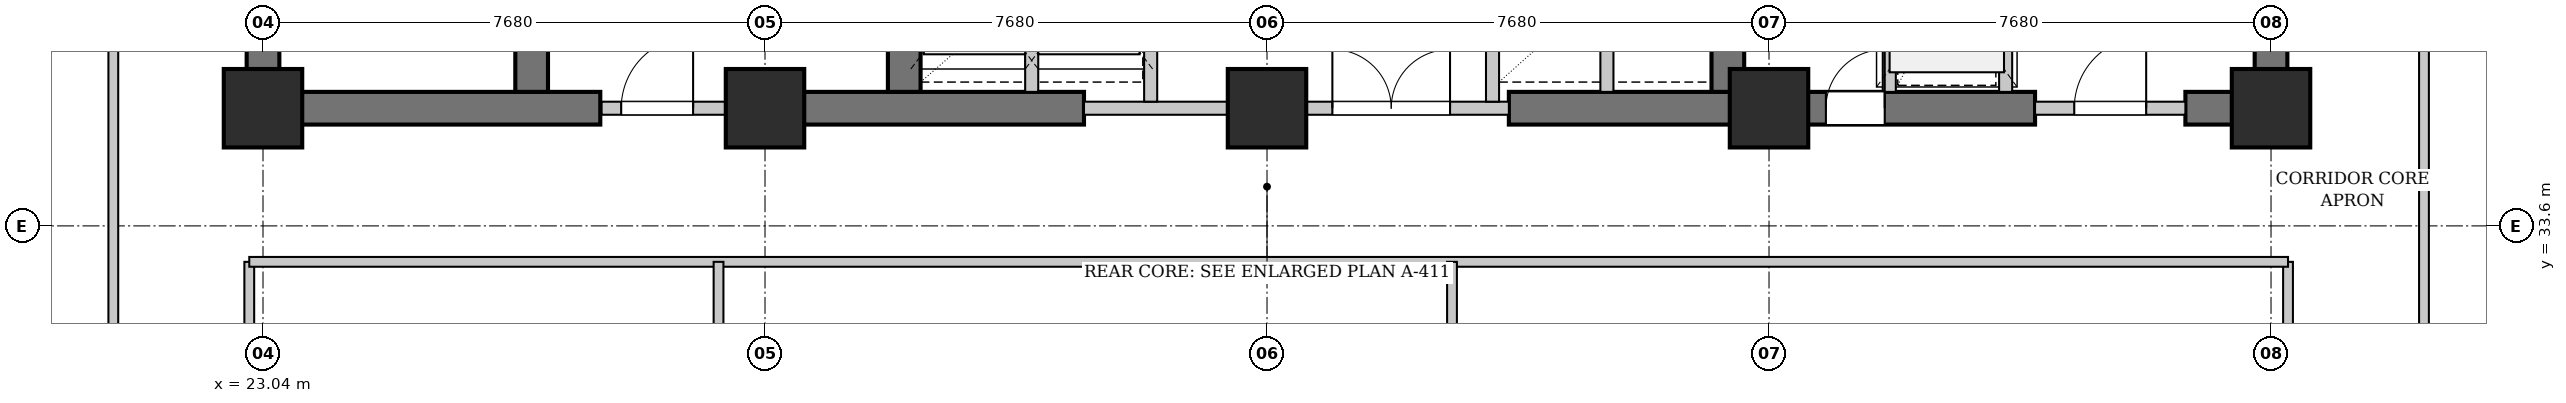
"""IFC4 building model, lengths in metres.
Left out: names, types, materials, properties, quantities, classifications, styles, units other than length and angle.
Written with IfcOpenShell. Run it as: python <this file> out.ifc"""

import sys

from ifc_helpers import new_model, si_unit, direction, frame, frame_2d, origin, origin_2d, place, context, subcontext, project, spatial, rectangle, extrude, element, fill, save


model = new_model("IFC4")
c1 = context("Model", 3, precision=1e-05, world=origin(), true_north=direction((0.0, 1.0)))
c2 = subcontext(c1, "Body", "Model", "MODEL_VIEW")
j1 = project(units=[si_unit("LENGTHUNIT", "METRE"), si_unit("PLANEANGLEUNIT", "RADIAN")], contexts=[c1])
p1 = place(None, origin())
s1 = spatial("IfcSite", under=j1, at=p1, CompositionType="ELEMENT")
p2 = place(p1, origin())
s2 = spatial("IfcBuilding", under=s1, at=p2, CompositionType="ELEMENT")
p3 = place(p2, frame((0.0, 0.0, 37.2)))
s3 = spatial("IfcBuildingStorey", under=s2, at=p3, CompositionType="ELEMENT", Elevation=37.2)
p4 = place(p3, frame((22.79, 35.4, 0.0), z_axis=(0.0, 0.0, 1.0), x_axis=(1.0, 0.0, 0.0)))
e1 = element("IfcWall", 1, at=p4, inside=s3, PredefinedType="SHEAR", context=c2, shape_type="SweptSolid", body=[
    extrude(rectangle(XDim=5.41, YDim=0.5, at=frame_2d((2.705, 0.0))), origin(), (0.0, 0.0, 1.0), 3.18),
])
p5 = place(p3, frame((30.72, 35.4, 0.0), z_axis=(0.0, 0.0, 1.0), x_axis=(1.0, 0.0, 0.0)))
e2 = element("IfcWall", 2, at=p5, inside=s3, PredefinedType="SHEAR", context=c2, shape_type="SweptSolid", body=[
    extrude(rectangle(XDim=4.88, YDim=0.5, at=frame_2d((2.44, 0.0))), origin(), (0.0, 0.0, 1.0), 3.18),
])
p6 = place(p3, frame((42.1, 35.4, 0.0), z_axis=(0.0, 0.0, 1.0), x_axis=(1.0, 0.0, 0.0)))
e3 = element("IfcWall", 3, at=p6, inside=s3, PredefinedType="SHEAR", context=c2, shape_type="SweptSolid", body=[
    extrude(rectangle(XDim=8.05, YDim=0.5, at=frame_2d((4.025, 0.0))), origin(), (0.0, 0.0, 1.0), 3.18),
])
p7 = place(p6, frame((4.85, 0.0, 0.0)))
e4 = element("IfcOpeningElement", 4, at=p7, cuts=e3, PredefinedType="OPENING", context=c2, shape_type="SweptSolid", body=[
    extrude(rectangle(XDim=0.9, YDim=2.15, at=frame_2d((0.45, 1.075))), frame((0.0, 0.26, 0.0), z_axis=(0.0, -1.0, 0.0), x_axis=(1.0, 0.0, 0.0)), (0.0, 0.0, 1.0), 0.52),
])
p8 = place(p3, frame((52.45, 35.4, 0.0), z_axis=(0.0, 0.0, 1.0), x_axis=(1.0, 0.0, 0.0)))
e5 = element("IfcWall", 5, at=p8, inside=s3, PredefinedType="SHEAR", context=c2, shape_type="SweptSolid", body=[
    extrude(rectangle(XDim=1.56, YDim=0.5, at=frame_2d((0.78, 0.0))), origin(), (0.0, 0.0, 1.0), 3.18),
])
p9 = place(p3, frame((23.04, 35.65, 0.0), z_axis=(0.0, 0.0, 1.0), x_axis=(0.0, 1.0, 0.0)))
e6 = element("IfcWall", 6, at=p9, inside=s3, PredefinedType="SHEAR", context=c2, shape_type="SweptSolid", body=[
    extrude(rectangle(XDim=10.3, YDim=0.5, at=frame_2d((5.15, 0.0))), origin(), (0.0, 0.0, 1.0), 3.18),
])
p10 = place(p3, frame((27.15, 35.65, 0.0), z_axis=(0.0, 0.0, 1.0), x_axis=(0.0, 1.0, 0.0)))
e7 = element("IfcWall", 7, at=p10, inside=s3, PredefinedType="SHEAR", context=c2, shape_type="SweptSolid", body=[
    extrude(rectangle(XDim=10.3, YDim=0.5, at=frame_2d((5.15, 0.0))), origin(), (0.0, 0.0, 1.0), 3.18),
])
p11 = place(p10, frame((0.65, 0.0, 0.0)))
e8 = element("IfcOpeningElement", 8, at=p11, cuts=e7, PredefinedType="OPENING", context=c2, shape_type="SweptSolid", body=[
    extrude(rectangle(XDim=1.1, YDim=2.15, at=frame_2d((0.55, 1.075))), frame((0.0, 0.26, 0.0), z_axis=(0.0, -1.0, 0.0), x_axis=(1.0, 0.0, 0.0)), (0.0, 0.0, 1.0), 0.52),
])
for number, where, z_axis, x_axis in (
    (9, (32.85, 35.65, 0.0), (0.0, 0.0, 1.0), (0.0, 1.0, 0.0)),
    (10, (45.45, 35.65, 0.0), (0.0, 0.0, 1.0), (0.0, 1.0, 0.0)),
    (11, (53.76, 35.65, 0.0), (0.0, 0.0, 1.0), (0.0, 1.0, 0.0)),
):
    element("IfcWall", number, at=place(p3, frame(where, z_axis=z_axis, x_axis=x_axis)), inside=s3, PredefinedType="SHEAR", context=c2, shape_type="SweptSolid", body=[
        extrude(rectangle(XDim=10.3, YDim=0.5, at=frame_2d((5.15, 0.0))), origin(), (0.0, 0.0, 1.0), 3.18),
    ])
for number, where, z_axis, x_axis in (
    (12, (23.04, 35.4, 0.0), (0.0, 0.0, 1.0), (1.0, 0.0, 0.0)),
    (13, (30.72, 35.4, 0.0), (0.0, 0.0, 1.0), (1.0, 0.0, 0.0)),
    (14, (38.4, 35.4, 0.0), (0.0, 0.0, 1.0), (1.0, 0.0, 0.0)),
    (15, (46.08, 35.4, 0.0), (0.0, 0.0, 1.0), (1.0, 0.0, 0.0)),
    (16, (53.76, 35.4, 0.0), (0.0, 0.0, 1.0), (1.0, 0.0, 0.0)),
):
    element("IfcColumn", number, at=place(p3, frame(where, z_axis=z_axis, x_axis=x_axis)), inside=s3, PredefinedType="COLUMN", context=c2, shape_type="SweptSolid", body=[
        extrude(rectangle(XDim=1.2, YDim=1.2, at=origin_2d()), origin(), (0.0, 0.0, 1.0), 3.4),
    ])
p12 = place(p3, frame((28.22, 35.4, 0.0), z_axis=(0.0, 0.0, 1.0), x_axis=(1.0, 0.0, 0.0)))
e17 = element("IfcWall", 17, at=p12, inside=s3, PredefinedType="PARTITIONING", context=c2, shape_type="SweptSolid", body=[
    extrude(rectangle(XDim=2.5, YDim=0.2, at=frame_2d((1.25, 0.0))), origin(), (0.0, 0.0, 1.0), 2.475),
])
p13 = place(p12, frame((0.3, 0.0, 0.0)))
e18 = element("IfcOpeningElement", 18, at=p13, cuts=e17, PredefinedType="OPENING", context=c2, shape_type="SweptSolid", body=[
    extrude(rectangle(XDim=1.1, YDim=2.15, at=frame_2d((0.55, 1.075))), frame((0.0, 0.11, 0.0), z_axis=(0.0, -1.0, 0.0), x_axis=(1.0, 0.0, 0.0)), (0.0, 0.0, 1.0), 0.22),
])
p14 = place(p3, frame((35.6, 35.4, 0.0), z_axis=(0.0, 0.0, 1.0), x_axis=(1.0, 0.0, 0.0)))
e19 = element("IfcWall", 19, at=p14, inside=s3, PredefinedType="PARTITIONING", context=c2, shape_type="SweptSolid", body=[
    extrude(rectangle(XDim=6.5, YDim=0.2, at=frame_2d((3.25, 0.0))), origin(), (0.0, 0.0, 1.0), 2.475),
])
p15 = place(p14, frame((3.8, 0.0, 0.0)))
e20 = element("IfcOpeningElement", 20, at=p15, cuts=e19, PredefinedType="OPENING", context=c2, shape_type="SweptSolid", body=[
    extrude(rectangle(XDim=1.8, YDim=2.3, at=frame_2d((0.9, 1.15))), frame((0.0, 0.11, 0.0), z_axis=(0.0, -1.0, 0.0), x_axis=(1.0, 0.0, 0.0)), (0.0, 0.0, 1.0), 0.22),
])
p16 = place(p3, frame((34.8, 35.65, 0.0), z_axis=(0.0, 0.0, 1.0), x_axis=(0.0, 1.0, 0.0)))
e21 = element("IfcWall", 21, at=p16, inside=s3, PredefinedType="PARTITIONING", context=c2, shape_type="SweptSolid", body=[
    extrude(rectangle(XDim=3.25, YDim=0.2, at=frame_2d((1.625, 0.0))), origin(), (0.0, 0.0, 1.0), 3.18),
])
p17 = place(p3, frame((36.62, 35.5, 0.0), z_axis=(0.0, 0.0, 1.0), x_axis=(0.0, 1.0, 0.0)))
e22 = element("IfcWall", 22, at=p17, inside=s3, PredefinedType="PARTITIONING", context=c2, shape_type="SweptSolid", body=[
    extrude(rectangle(XDim=3.4, YDim=0.2, at=frame_2d((1.7, 0.0))), origin(), (0.0, 0.0, 1.0), 3.18),
])
p18 = place(p3, frame((43.6, 35.65, 0.0), z_axis=(0.0, 0.0, 1.0), x_axis=(0.0, 1.0, 0.0)))
e23 = element("IfcWall", 23, at=p18, inside=s3, PredefinedType="PARTITIONING", context=c2, shape_type="SweptSolid", body=[
    extrude(rectangle(XDim=3.25, YDim=0.2, at=frame_2d((1.625, 0.0))), origin(), (0.0, 0.0, 1.0), 3.18),
])
p19 = place(p3, frame((41.85, 35.5, 0.0), z_axis=(0.0, 0.0, 1.0), x_axis=(0.0, 1.0, 0.0)))
e24 = element("IfcWall", 24, at=p19, inside=s3, PredefinedType="PARTITIONING", context=c2, shape_type="SweptSolid", body=[
    extrude(rectangle(XDim=3.4, YDim=0.2, at=frame_2d((1.7, 0.0))), origin(), (0.0, 0.0, 1.0), 3.18),
])
p20 = place(p3, frame((50.15, 35.4, 0.0), z_axis=(0.0, 0.0, 1.0), x_axis=(1.0, 0.0, 0.0)))
e25 = element("IfcWall", 25, at=p20, inside=s3, PredefinedType="PARTITIONING", context=c2, shape_type="SweptSolid", body=[
    extrude(rectangle(XDim=2.3, YDim=0.2, at=frame_2d((1.15, 0.0))), origin(), (0.0, 0.0, 1.0), 2.475),
])
p21 = place(p20, frame((0.6, 0.0, 0.0)))
e26 = element("IfcOpeningElement", 26, at=p21, cuts=e25, PredefinedType="OPENING", context=c2, shape_type="SweptSolid", body=[
    extrude(rectangle(XDim=1.1, YDim=2.15, at=frame_2d((0.55, 1.075))), frame((0.0, 0.11, 0.0), z_axis=(0.0, -1.0, 0.0), x_axis=(1.0, 0.0, 0.0)), (0.0, 0.0, 1.0), 0.22),
])
p22 = place(p3, frame((49.7, 35.65, 0.0), z_axis=(0.0, 0.0, 1.0), x_axis=(0.0, 1.0, 0.0)))
e27 = element("IfcWall", 27, at=p22, inside=s3, PredefinedType="PARTITIONING", context=c2, shape_type="SweptSolid", body=[
    extrude(rectangle(XDim=3.15, YDim=0.2, at=frame_2d((1.575, 0.0))), origin(), (0.0, 0.0, 1.0), 3.18),
])
p23 = place(p22, frame((0.85, 0.0, 0.0)))
e28 = element("IfcOpeningElement", 28, at=p23, cuts=e27, PredefinedType="OPENING", context=c2, shape_type="SweptSolid", body=[
    extrude(rectangle(XDim=1.2, YDim=2.2, at=frame_2d((0.6, 1.1))), frame((0.0, 0.11, 0.0), z_axis=(0.0, -1.0, 0.0), x_axis=(1.0, 0.0, 0.0)), (0.0, 0.0, 1.0), 0.22),
])
p24 = place(p3, frame((47.92, 35.65, 0.0), z_axis=(0.0, 0.0, 1.0), x_axis=(0.0, 1.0, 0.0)))
e29 = element("IfcWall", 29, at=p24, inside=s3, PredefinedType="PARTITIONING", context=c2, shape_type="SweptSolid", body=[
    extrude(rectangle(XDim=3.15, YDim=0.2, at=frame_2d((1.575, 0.0))), origin(), (0.0, 0.0, 1.0), 3.18),
])
p25 = place(p3, frame((20.75, 20.95, 0.0), z_axis=(0.0, 0.0, 1.0), x_axis=(0.0, 1.0, 0.0)))
e30 = element("IfcWall", 30, at=p25, inside=s3, PredefinedType="PARTITIONING", context=c2, shape_type="SweptSolid", body=[
    extrude(rectangle(XDim=27.57, YDim=0.15, at=frame_2d((13.785, 0.0))), origin(), (0.0, 0.0, 1.0), 3.18),
])
p26 = place(p25, frame((1.03, 0.0, 0.0)))
e31 = element("IfcOpeningElement", 31, at=p26, cuts=e30, PredefinedType="OPENING", context=c2, shape_type="SweptSolid", body=[
    extrude(rectangle(XDim=0.9, YDim=2.15, at=frame_2d((0.45, 1.075))), frame((0.0, 0.085, 0.0), z_axis=(0.0, -1.0, 0.0), x_axis=(1.0, 0.0, 0.0)), (0.0, 0.0, 1.0), 0.17),
])
p27 = place(p3, frame((56.1, 20.95, 0.0), z_axis=(0.0, 0.0, 1.0), x_axis=(0.0, 1.0, 0.0)))
e32 = element("IfcWall", 32, at=p27, inside=s3, PredefinedType="PARTITIONING", context=c2, shape_type="SweptSolid", body=[
    extrude(rectangle(XDim=27.57, YDim=0.15, at=frame_2d((13.785, 0.0))), origin(), (0.0, 0.0, 1.0), 3.18),
])
p28 = place(p27, frame((1.03, 0.0, 0.0)))
e33 = element("IfcOpeningElement", 33, at=p28, cuts=e32, PredefinedType="OPENING", context=c2, shape_type="SweptSolid", body=[
    extrude(rectangle(XDim=0.9, YDim=2.15, at=frame_2d((0.45, 1.075))), frame((0.0, 0.085, 0.0), z_axis=(0.0, -1.0, 0.0), x_axis=(1.0, 0.0, 0.0)), (0.0, 0.0, 1.0), 0.17),
])
p29 = place(p3, frame((22.83, 23.03, 0.0), z_axis=(0.0, 0.0, 1.0), x_axis=(0.0, 1.0, 0.0)))
e34 = element("IfcWall", 34, at=p29, inside=s3, PredefinedType="PARTITIONING", context=c2, shape_type="SweptSolid", body=[
    extrude(rectangle(XDim=10.02, YDim=0.15, at=frame_2d((5.01, 0.0))), origin(), (0.0, 0.0, 1.0), 2.475),
])
p30 = place(p3, frame((54.02, 23.03, 0.0), z_axis=(0.0, 0.0, 1.0), x_axis=(0.0, 1.0, 0.0)))
e35 = element("IfcWall", 35, at=p30, inside=s3, PredefinedType="PARTITIONING", context=c2, shape_type="SweptSolid", body=[
    extrude(rectangle(XDim=10.02, YDim=0.15, at=frame_2d((5.01, 0.0))), origin(), (0.0, 0.0, 1.0), 3.18),
])
p31 = place(p3, frame((22.83, 33.05, 0.0), z_axis=(0.0, 0.0, 1.0), x_axis=(1.0, 0.0, 0.0)))
e36 = element("IfcWall", 36, at=p31, inside=s3, PredefinedType="PARTITIONING", context=c2, shape_type="SweptSolid", body=[
    extrude(rectangle(XDim=31.19, YDim=0.15, at=frame_2d((15.595, 0.0))), origin(), (0.0, 0.0, 1.0), 3.18),
])
for number, where, z_axis, x_axis in (
    (37, (30.009, 23.03, 0.0), (0.0, 0.0, 1.0), (0.0, 1.0, 0.0)),
    (38, (41.23, 23.03, 0.0), (0.0, 0.0, 1.0), (0.0, 1.0, 0.0)),
):
    element("IfcWall", number, at=place(p3, frame(where, z_axis=z_axis, x_axis=x_axis)), inside=s3, PredefinedType="PARTITIONING", context=c2, shape_type="SweptSolid", body=[
        extrude(rectangle(XDim=10.02, YDim=0.15, at=frame_2d((5.01, 0.0))), origin(), (0.0, 0.0, 1.0), 3.18),
    ])
p32 = place(p13, origin())
e39 = element("IfcDoor", 39, at=p32, inside=s3, OperationType="SINGLE_SWING_RIGHT", PredefinedType="DOOR", context=c2, shape_type="SweptSolid", body=[
    extrude(rectangle(XDim=1.1, YDim=2.15, at=frame_2d((0.55, 1.075))), frame((0.0, 0.025, 0.0), z_axis=(0.0, -1.0, 0.0), x_axis=(1.0, 0.0, 0.0)), (0.0, 0.0, 1.0), 0.05),
])
fill(e18, e39)
p33 = place(p15, origin())
e40 = element("IfcDoor", 40, at=p33, inside=s3, OperationType="DOUBLE_DOOR_SINGLE_SWING", PredefinedType="DOOR", context=c2, shape_type="SweptSolid", body=[
    extrude(rectangle(XDim=1.8, YDim=2.3, at=frame_2d((0.9, 1.15))), frame((0.0, 0.025, 0.0), z_axis=(0.0, -1.0, 0.0), x_axis=(1.0, 0.0, 0.0)), (0.0, 0.0, 1.0), 0.05),
])
fill(e20, e40)
p34 = place(p21, origin())
e41 = element("IfcDoor", 41, at=p34, inside=s3, OperationType="SINGLE_SWING_RIGHT", PredefinedType="DOOR", context=c2, shape_type="SweptSolid", body=[
    extrude(rectangle(XDim=1.1, YDim=2.15, at=frame_2d((0.55, 1.075))), frame((0.0, 0.025, 0.0), z_axis=(0.0, -1.0, 0.0), x_axis=(1.0, 0.0, 0.0)), (0.0, 0.0, 1.0), 0.05),
])
fill(e26, e41)
p35 = place(p7, origin())
e42 = element("IfcDoor", 42, at=p35, inside=s3, OperationType="SINGLE_SWING_RIGHT", PredefinedType="DOOR", context=c2, shape_type="SweptSolid", body=[
    extrude(rectangle(XDim=0.9, YDim=2.15, at=frame_2d((0.45, 1.075))), frame((0.0, 0.025, 0.0), z_axis=(0.0, -1.0, 0.0), x_axis=(1.0, 0.0, 0.0)), (0.0, 0.0, 1.0), 0.05),
])
fill(e4, e42)
save(model, sys.argv[1])
